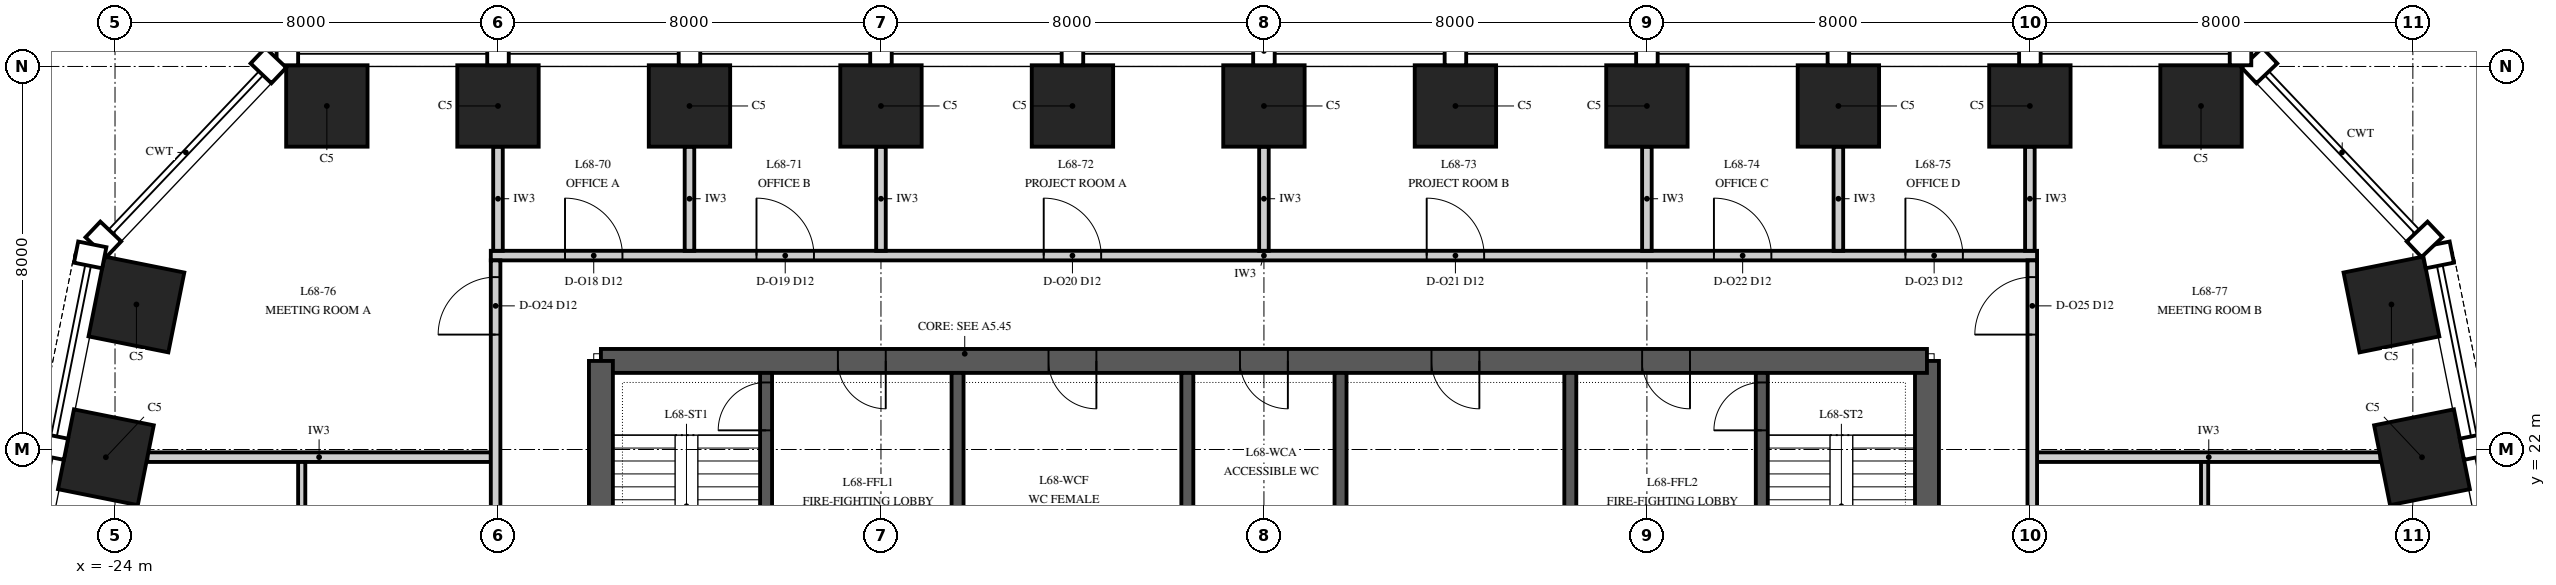
"""IFC4 building model, lengths in metres.
Left out: names, types, materials, properties, quantities, classifications, styles, units other than length and angle.
Written with IfcOpenShell. Run it as: python <this file> out.ifc"""

import sys

from ifc_helpers import new_model, si_unit, direction, frame, frame_2d, origin, origin_2d, place, context, subcontext, project, spatial, polyline, rectangle, outline, extrude, element, fill, save


model = new_model("IFC4")
c1 = context("Model", 3, precision=1e-05, world=origin(), true_north=direction((0.0, 1.0)))
c2 = subcontext(c1, "Body", "Model", "MODEL_VIEW")
j1 = project(units=[si_unit("LENGTHUNIT", "METRE"), si_unit("PLANEANGLEUNIT", "RADIAN")], contexts=[c1])
p1 = place(None, origin())
s1 = spatial("IfcSite", under=j1, at=p1, CompositionType="ELEMENT")
p2 = place(p1, origin())
s2 = spatial("IfcBuilding", under=s1, at=p2, CompositionType="ELEMENT")
p3 = place(p2, frame((0.0, 0.0, 292.0)))
s3 = spatial("IfcBuildingStorey", under=s2, at=p3, CompositionType="ELEMENT", Elevation=292.0)
for number, where, z_axis, x_axis in (
    (1, (24.191, 21.838, 0.0), (0.0, 0.0, 1.0), (-0.196, 0.981, 0.0)),
    (2, (23.553, 25.029, 0.0), (0.0, 0.0, 1.0), (-0.196, 0.981, 0.0)),
    (3, (19.575, 29.175, 0.0), (0.0, 0.0, 1.0), (-1.0, 0.0, 0.0)),
    (4, (16.0, 29.175, 0.0), (0.0, 0.0, 1.0), (-1.0, 0.0, 0.0)),
    (5, (12.0, 29.175, 0.0), (0.0, 0.0, 1.0), (-1.0, 0.0, 0.0)),
    (6, (8.0, 29.175, 0.0), (0.0, 0.0, 1.0), (-1.0, 0.0, 0.0)),
    (7, (4.0, 29.175, 0.0), (0.0, 0.0, 1.0), (-1.0, 0.0, 0.0)),
    (8, (0.0, 29.175, 0.0), (0.0, 0.0, 1.0), (-1.0, 0.0, 0.0)),
    (9, (-4.0, 29.175, 0.0), (0.0, 0.0, 1.0), (-1.0, 0.0, 0.0)),
    (10, (-8.0, 29.175, 0.0), (0.0, 0.0, 1.0), (-1.0, 0.0, 0.0)),
    (11, (-12.0, 29.175, 0.0), (0.0, 0.0, 1.0), (-1.0, 0.0, 0.0)),
    (12, (-16.0, 29.175, 0.0), (0.0, 0.0, 1.0), (-1.0, 0.0, 0.0)),
    (13, (-19.575, 29.175, 0.0), (0.0, 0.0, 1.0), (-1.0, 0.0, 0.0)),
    (14, (-23.553, 25.029, 0.0), (0.0, 0.0, 1.0), (-0.196, -0.981, 0.0)),
    (15, (-24.191, 21.838, 0.0), (0.0, 0.0, 1.0), (-0.196, -0.981, 0.0)),
):
    element("IfcColumn", number, at=place(p3, frame(where, z_axis=z_axis, x_axis=x_axis)), inside=s3, PredefinedType="COLUMN", context=c2, shape_type="SweptSolid", body=[
        extrude(rectangle(XDim=1.7, YDim=1.7, at=origin_2d()), origin(), (0.0, 0.0, 1.0), 4.0),
    ])
p4 = place(p3, frame((13.85, 6.15, 0.0), z_axis=(0.0, 0.0, 1.0), x_axis=(0.0, 1.0, 0.0)))
e16 = element("IfcWall", 16, at=p4, inside=s3, PredefinedType="SHEAR", context=c2, shape_type="SweptSolid", body=[
    extrude(outline(polyline([(0.0, -0.25), (17.7, -0.25), (17.7, 0.0), (17.45, 0.0), (17.45, 0.25), (0.25, 0.25), (0.25, 0.0), (0.0, 0.0), (0.0, -0.25)])), origin(), (0.0, 0.0, 1.0), 4.0),
])
p5 = place(p4, frame((4.15, 0.0, 0.0)))
e17 = element("IfcOpeningElement", 17, at=p5, cuts=e16, PredefinedType="OPENING", context=c2, shape_type="SweptSolid", body=[
    extrude(rectangle(XDim=1.8, YDim=2.4, at=frame_2d((0.9, 1.2))), frame((0.0, 0.265, 0.0), z_axis=(0.0, -1.0, 0.0), x_axis=(1.0, 0.0, 0.0)), (0.0, 0.0, 1.0), 0.53),
])
p6 = place(p3, frame((13.85, 23.85, 0.0), z_axis=(0.0, 0.0, 1.0), x_axis=(-1.0, 0.0, 0.0)))
e18 = element("IfcWall", 18, at=p6, inside=s3, PredefinedType="SHEAR", context=c2, shape_type="SweptSolid", body=[
    extrude(rectangle(XDim=27.7, YDim=0.5, at=frame_2d((13.85, 0.0))), origin(), (0.0, 0.0, 1.0), 4.0),
])
p7 = place(p6, frame((21.75, 0.0, 0.0)))
e19 = element("IfcOpeningElement", 19, at=p7, cuts=e18, PredefinedType="OPENING", context=c2, shape_type="SweptSolid", body=[
    extrude(rectangle(XDim=1.0, YDim=2.1, at=frame_2d((0.5, 1.05))), frame((0.0, 0.265, 0.0), z_axis=(0.0, -1.0, 0.0), x_axis=(1.0, 0.0, 0.0)), (0.0, 0.0, 1.0), 0.53),
])
p8 = place(p6, frame((4.95, 0.0, 0.0)))
e20 = element("IfcOpeningElement", 20, at=p8, cuts=e18, PredefinedType="OPENING", context=c2, shape_type="SweptSolid", body=[
    extrude(rectangle(XDim=1.0, YDim=2.1, at=frame_2d((0.5, 1.05))), frame((0.0, 0.265, 0.0), z_axis=(0.0, -1.0, 0.0), x_axis=(1.0, 0.0, 0.0)), (0.0, 0.0, 1.0), 0.53),
])
p9 = place(p6, frame((17.35, 0.0, 0.0)))
e21 = element("IfcOpeningElement", 21, at=p9, cuts=e18, PredefinedType="OPENING", context=c2, shape_type="SweptSolid", body=[
    extrude(rectangle(XDim=1.0, YDim=2.1, at=frame_2d((0.5, 1.05))), frame((0.0, 0.265, 0.0), z_axis=(0.0, -1.0, 0.0), x_axis=(1.0, 0.0, 0.0)), (0.0, 0.0, 1.0), 0.53),
])
p10 = place(p6, frame((13.35, 0.0, 0.0)))
e22 = element("IfcOpeningElement", 22, at=p10, cuts=e18, PredefinedType="OPENING", context=c2, shape_type="SweptSolid", body=[
    extrude(rectangle(XDim=1.0, YDim=2.1, at=frame_2d((0.5, 1.05))), frame((0.0, 0.265, 0.0), z_axis=(0.0, -1.0, 0.0), x_axis=(1.0, 0.0, 0.0)), (0.0, 0.0, 1.0), 0.53),
])
p11 = place(p6, frame((9.35, 0.0, 0.0)))
e23 = element("IfcOpeningElement", 23, at=p11, cuts=e18, PredefinedType="OPENING", context=c2, shape_type="SweptSolid", body=[
    extrude(rectangle(XDim=1.0, YDim=2.1, at=frame_2d((0.5, 1.05))), frame((0.0, 0.265, 0.0), z_axis=(0.0, -1.0, 0.0), x_axis=(1.0, 0.0, 0.0)), (0.0, 0.0, 1.0), 0.53),
])
p12 = place(p3, frame((-13.85, 23.85, 0.0), z_axis=(0.0, 0.0, 1.0), x_axis=(0.0, -1.0, 0.0)))
e24 = element("IfcWall", 24, at=p12, inside=s3, PredefinedType="SHEAR", context=c2, shape_type="SweptSolid", body=[
    extrude(outline(polyline([(0.0, -0.25), (17.7, -0.25), (17.7, 0.0), (17.45, 0.0), (17.45, 0.25), (0.25, 0.25), (0.25, 0.0), (0.0, 0.0), (0.0, -0.25)])), origin(), (0.0, 0.0, 1.0), 4.0),
])
p13 = place(p12, frame((11.75, 0.0, 0.0)))
e25 = element("IfcOpeningElement", 25, at=p13, cuts=e24, PredefinedType="OPENING", context=c2, shape_type="SweptSolid", body=[
    extrude(rectangle(XDim=1.8, YDim=2.4, at=frame_2d((0.9, 1.2))), frame((0.0, 0.265, 0.0), z_axis=(0.0, -1.0, 0.0), x_axis=(1.0, 0.0, 0.0)), (0.0, 0.0, 1.0), 0.53),
])
p14 = place(p3, frame((-10.4, 16.125, 0.0), z_axis=(0.0, 0.0, 1.0), x_axis=(0.0, 1.0, 0.0)))
e26 = element("IfcWall", 26, at=p14, inside=s3, PredefinedType="SHEAR", context=c2, shape_type="SweptSolid", body=[
    extrude(rectangle(XDim=7.475, YDim=0.25, at=frame_2d((3.738, 0.0))), origin(), (0.0, 0.0, 1.0), 4.0),
])
p15 = place(p14, frame((6.275, 0.0, 0.0)))
e27 = element("IfcOpeningElement", 27, at=p15, cuts=e26, PredefinedType="OPENING", context=c2, shape_type="SweptSolid", body=[
    extrude(rectangle(XDim=1.0, YDim=2.1, at=frame_2d((0.5, 1.05))), frame((0.0, 0.14, 0.0), z_axis=(0.0, -1.0, 0.0), x_axis=(1.0, 0.0, 0.0)), (0.0, 0.0, 1.0), 0.28),
])
for number, where, z_axis, x_axis in (
    (28, (-6.4, 16.125, 0.0), (0.0, 0.0, 1.0), (0.0, 1.0, 0.0)),
    (29, (-1.6, 16.125, 0.0), (0.0, 0.0, 1.0), (0.0, 1.0, 0.0)),
    (30, (1.6, 16.125, 0.0), (0.0, 0.0, 1.0), (0.0, 1.0, 0.0)),
    (31, (6.4, 16.125, 0.0), (0.0, 0.0, 1.0), (0.0, 1.0, 0.0)),
):
    element("IfcWall", number, at=place(p3, frame(where, z_axis=z_axis, x_axis=x_axis)), inside=s3, PredefinedType="SHEAR", context=c2, shape_type="SweptSolid", body=[
        extrude(rectangle(XDim=7.475, YDim=0.25, at=frame_2d((3.738, 0.0))), origin(), (0.0, 0.0, 1.0), 4.0),
    ])
p16 = place(p3, frame((10.4, 16.125, 0.0), z_axis=(0.0, 0.0, 1.0), x_axis=(0.0, 1.0, 0.0)))
e32 = element("IfcWall", 32, at=p16, inside=s3, PredefinedType="SHEAR", context=c2, shape_type="SweptSolid", body=[
    extrude(rectangle(XDim=7.475, YDim=0.25, at=frame_2d((3.738, 0.0))), origin(), (0.0, 0.0, 1.0), 4.0),
])
p17 = place(p16, frame((6.275, 0.0, 0.0)))
e33 = element("IfcOpeningElement", 33, at=p17, cuts=e32, PredefinedType="OPENING", context=c2, shape_type="SweptSolid", body=[
    extrude(rectangle(XDim=1.0, YDim=2.1, at=frame_2d((0.5, 1.05))), frame((0.0, 0.14, 0.0), z_axis=(0.0, -1.0, 0.0), x_axis=(1.0, 0.0, 0.0)), (0.0, 0.0, 1.0), 0.28),
])
for number, where, z_axis, x_axis in (
    (34, (-23.324, 21.84, 0.0), (0.0, 0.0, 1.0), (1.0, 0.0, 0.0)),
    (35, (16.15, 21.84, 0.0), (0.0, 0.0, 1.0), (1.0, 0.0, 0.0)),
):
    element("IfcWall", number, at=place(p3, frame(where, z_axis=z_axis, x_axis=x_axis)), inside=s3, PredefinedType="PARTITIONING", context=c2, shape_type="SweptSolid", body=[
        extrude(rectangle(XDim=7.174, YDim=0.2, at=frame_2d((3.587, 0.0))), origin(), (0.0, 0.0, 1.0), 3.23),
    ])
p18 = place(p3, frame((-16.15, 26.05, 0.0), z_axis=(0.0, 0.0, 1.0), x_axis=(1.0, 0.0, 0.0)))
e36 = element("IfcWall", 36, at=p18, inside=s3, PredefinedType="PARTITIONING", context=c2, shape_type="SweptSolid", body=[
    extrude(rectangle(XDim=32.3, YDim=0.2, at=frame_2d((16.15, 0.0))), origin(), (0.0, 0.0, 1.0), 3.418),
])
p19 = place(p18, frame((1.55, 0.0, 0.0)))
e37 = element("IfcOpeningElement", 37, at=p19, cuts=e36, PredefinedType="OPENING", context=c2, shape_type="SweptSolid", body=[
    extrude(rectangle(XDim=1.2, YDim=2.4, at=frame_2d((0.6, 1.2))), frame((0.0, 0.115, 0.0), z_axis=(0.0, -1.0, 0.0), x_axis=(1.0, 0.0, 0.0)), (0.0, 0.0, 1.0), 0.23),
])
p20 = place(p18, frame((5.55, 0.0, 0.0)))
e38 = element("IfcOpeningElement", 38, at=p20, cuts=e36, PredefinedType="OPENING", context=c2, shape_type="SweptSolid", body=[
    extrude(rectangle(XDim=1.2, YDim=2.4, at=frame_2d((0.6, 1.2))), frame((0.0, 0.115, 0.0), z_axis=(0.0, -1.0, 0.0), x_axis=(1.0, 0.0, 0.0)), (0.0, 0.0, 1.0), 0.23),
])
p21 = place(p18, frame((11.55, 0.0, 0.0)))
e39 = element("IfcOpeningElement", 39, at=p21, cuts=e36, PredefinedType="OPENING", context=c2, shape_type="SweptSolid", body=[
    extrude(rectangle(XDim=1.2, YDim=2.4, at=frame_2d((0.6, 1.2))), frame((0.0, 0.115, 0.0), z_axis=(0.0, -1.0, 0.0), x_axis=(1.0, 0.0, 0.0)), (0.0, 0.0, 1.0), 0.23),
])
p22 = place(p18, frame((19.55, 0.0, 0.0)))
e40 = element("IfcOpeningElement", 40, at=p22, cuts=e36, PredefinedType="OPENING", context=c2, shape_type="SweptSolid", body=[
    extrude(rectangle(XDim=1.2, YDim=2.4, at=frame_2d((0.6, 1.2))), frame((0.0, 0.115, 0.0), z_axis=(0.0, -1.0, 0.0), x_axis=(1.0, 0.0, 0.0)), (0.0, 0.0, 1.0), 0.23),
])
p23 = place(p18, frame((25.55, 0.0, 0.0)))
e41 = element("IfcOpeningElement", 41, at=p23, cuts=e36, PredefinedType="OPENING", context=c2, shape_type="SweptSolid", body=[
    extrude(rectangle(XDim=1.2, YDim=2.4, at=frame_2d((0.6, 1.2))), frame((0.0, 0.115, 0.0), z_axis=(0.0, -1.0, 0.0), x_axis=(1.0, 0.0, 0.0)), (0.0, 0.0, 1.0), 0.23),
])
p24 = place(p18, frame((29.55, 0.0, 0.0)))
e42 = element("IfcOpeningElement", 42, at=p24, cuts=e36, PredefinedType="OPENING", context=c2, shape_type="SweptSolid", body=[
    extrude(rectangle(XDim=1.2, YDim=2.4, at=frame_2d((0.6, 1.2))), frame((0.0, 0.115, 0.0), z_axis=(0.0, -1.0, 0.0), x_axis=(1.0, 0.0, 0.0)), (0.0, 0.0, 1.0), 0.23),
])
p25 = place(p3, frame((-20.1, 13.915, 0.0), z_axis=(0.0, 0.0, 1.0), x_axis=(0.0, 1.0, 0.0)))
e43 = element("IfcWall", 43, at=p25, inside=s3, PredefinedType="PARTITIONING", context=c2, shape_type="SweptSolid", body=[
    extrude(rectangle(XDim=7.825, YDim=0.15, at=frame_2d((3.913, 0.0))), origin(), (0.0, 0.0, 1.0), 3.23),
])
p26 = place(p25, frame((3.425, 0.0, 0.0)))
e44 = element("IfcOpeningElement", 44, at=p26, cuts=e43, PredefinedType="OPENING", context=c2, shape_type="SweptSolid", body=[
    extrude(rectangle(XDim=1.0, YDim=2.3, at=frame_2d((0.5, 1.15))), frame((0.0, 0.09, 0.0), z_axis=(0.0, -1.0, 0.0), x_axis=(1.0, 0.0, 0.0)), (0.0, 0.0, 1.0), 0.18),
])
p27 = place(p3, frame((-16.05, 4.05, 0.0), z_axis=(0.0, 0.0, 1.0), x_axis=(0.0, 1.0, 0.0)))
e45 = element("IfcWall", 45, at=p27, inside=s3, PredefinedType="PARTITIONING", context=c2, shape_type="SweptSolid", body=[
    extrude(rectangle(XDim=21.9, YDim=0.2, at=frame_2d((10.95, 0.0))), origin(), (0.0, 0.0, 1.0), 2.842),
])
p28 = place(p27, frame((20.35, 0.0, 0.0)))
e46 = element("IfcOpeningElement", 46, at=p28, cuts=e45, PredefinedType="OPENING", context=c2, shape_type="SweptSolid", body=[
    extrude(rectangle(XDim=1.2, YDim=2.4, at=frame_2d((0.6, 1.2))), frame((0.0, 0.115, 0.0), z_axis=(0.0, -1.0, 0.0), x_axis=(1.0, 0.0, 0.0)), (0.0, 0.0, 1.0), 0.23),
])
p29 = place(p27, frame((10.35, 0.0, 0.0)))
e47 = element("IfcOpeningElement", 47, at=p29, cuts=e45, PredefinedType="OPENING", context=c2, shape_type="SweptSolid", body=[
    extrude(rectangle(XDim=1.2, YDim=2.4, at=frame_2d((0.6, 1.2))), frame((0.0, 0.115, 0.0), z_axis=(0.0, -1.0, 0.0), x_axis=(1.0, 0.0, 0.0)), (0.0, 0.0, 1.0), 0.23),
])
for number, where, z_axis, x_axis in (
    (48, (-16.0, 26.15, 0.0), (0.0, 0.0, 1.0), (0.0, 1.0, 0.0)),
    (49, (-12.0, 26.15, 0.0), (0.0, 0.0, 1.0), (0.0, 1.0, 0.0)),
    (50, (-8.0, 26.15, 0.0), (0.0, 0.0, 1.0), (0.0, 1.0, 0.0)),
    (51, (0.0, 26.15, 0.0), (0.0, 0.0, 1.0), (0.0, 1.0, 0.0)),
    (52, (8.0, 26.15, 0.0), (0.0, 0.0, 1.0), (0.0, 1.0, 0.0)),
    (53, (12.0, 26.15, 0.0), (0.0, 0.0, 1.0), (0.0, 1.0, 0.0)),
    (54, (16.0, 26.15, 0.0), (0.0, 0.0, 1.0), (0.0, 1.0, 0.0)),
):
    element("IfcWall", number, at=place(p3, frame(where, z_axis=z_axis, x_axis=x_axis)), inside=s3, PredefinedType="PARTITIONING", context=c2, shape_type="SweptSolid", body=[
        extrude(rectangle(XDim=2.175, YDim=0.2, at=frame_2d((1.087, 0.0))), origin(), (0.0, 0.0, 1.0), 3.418),
    ])
p30 = place(p3, frame((16.05, 4.05, 0.0), z_axis=(0.0, 0.0, 1.0), x_axis=(0.0, 1.0, 0.0)))
e55 = element("IfcWall", 55, at=p30, inside=s3, PredefinedType="PARTITIONING", context=c2, shape_type="SweptSolid", body=[
    extrude(rectangle(XDim=21.9, YDim=0.2, at=frame_2d((10.95, 0.0))), origin(), (0.0, 0.0, 1.0), 2.842),
])
p31 = place(p30, frame((20.35, 0.0, 0.0)))
e56 = element("IfcOpeningElement", 56, at=p31, cuts=e55, PredefinedType="OPENING", context=c2, shape_type="SweptSolid", body=[
    extrude(rectangle(XDim=1.2, YDim=2.4, at=frame_2d((0.6, 1.2))), frame((0.0, 0.115, 0.0), z_axis=(0.0, -1.0, 0.0), x_axis=(1.0, 0.0, 0.0)), (0.0, 0.0, 1.0), 0.23),
])
p32 = place(p30, frame((10.35, 0.0, 0.0)))
e57 = element("IfcOpeningElement", 57, at=p32, cuts=e55, PredefinedType="OPENING", context=c2, shape_type="SweptSolid", body=[
    extrude(rectangle(XDim=1.2, YDim=2.4, at=frame_2d((0.6, 1.2))), frame((0.0, 0.115, 0.0), z_axis=(0.0, -1.0, 0.0), x_axis=(1.0, 0.0, 0.0)), (0.0, 0.0, 1.0), 0.23),
])
p33 = place(p3, frame((19.65, 17.915, 0.0), z_axis=(0.0, 0.0, 1.0), x_axis=(0.0, 1.0, 0.0)))
e58 = element("IfcWall", 58, at=p33, inside=s3, PredefinedType="PARTITIONING", context=c2, shape_type="SweptSolid", body=[
    extrude(rectangle(XDim=3.825, YDim=0.15, at=frame_2d((1.913, 0.0))), origin(), (0.0, 0.0, 1.0), 3.23),
])
p34 = place(p33, frame((1.425, 0.0, 0.0)))
e59 = element("IfcOpeningElement", 59, at=p34, cuts=e58, PredefinedType="OPENING", context=c2, shape_type="SweptSolid", body=[
    extrude(rectangle(XDim=1.0, YDim=2.3, at=frame_2d((0.5, 1.15))), frame((0.0, 0.09, 0.0), z_axis=(0.0, -1.0, 0.0), x_axis=(1.0, 0.0, 0.0)), (0.0, 0.0, 1.0), 0.18),
])
p35 = place(p7, origin())
e60 = element("IfcDoor", 60, at=p35, inside=s3, OperationType="SINGLE_SWING_RIGHT", PredefinedType="DOOR", context=c2, shape_type="SweptSolid", body=[
    extrude(rectangle(XDim=1.0, YDim=2.1, at=frame_2d((0.5, 1.05))), frame((0.0, 0.25, 0.0), z_axis=(0.0, -1.0, 0.0), x_axis=(1.0, 0.0, 0.0)), (0.0, 0.0, 1.0), 0.5),
])
fill(e19, e60)
p36 = place(p8, origin())
e61 = element("IfcDoor", 61, at=p36, inside=s3, OperationType="SINGLE_SWING_RIGHT", PredefinedType="DOOR", context=c2, shape_type="SweptSolid", body=[
    extrude(rectangle(XDim=1.0, YDim=2.1, at=frame_2d((0.5, 1.05))), frame((0.0, 0.25, 0.0), z_axis=(0.0, -1.0, 0.0), x_axis=(1.0, 0.0, 0.0)), (0.0, 0.0, 1.0), 0.5),
])
fill(e20, e61)
p37 = place(p9, origin())
e62 = element("IfcDoor", 62, at=p37, inside=s3, OperationType="SINGLE_SWING_LEFT", PredefinedType="DOOR", context=c2, shape_type="SweptSolid", body=[
    extrude(rectangle(XDim=1.0, YDim=2.1, at=frame_2d((0.5, 1.05))), frame((0.0, 0.25, 0.0), z_axis=(0.0, -1.0, 0.0), x_axis=(1.0, 0.0, 0.0)), (0.0, 0.0, 1.0), 0.5),
])
fill(e21, e62)
p38 = place(p10, origin())
e63 = element("IfcDoor", 63, at=p38, inside=s3, OperationType="SINGLE_SWING_LEFT", PredefinedType="DOOR", context=c2, shape_type="SweptSolid", body=[
    extrude(rectangle(XDim=1.0, YDim=2.1, at=frame_2d((0.5, 1.05))), frame((0.0, 0.25, 0.0), z_axis=(0.0, -1.0, 0.0), x_axis=(1.0, 0.0, 0.0)), (0.0, 0.0, 1.0), 0.5),
])
fill(e22, e63)
p39 = place(p11, origin())
e64 = element("IfcDoor", 64, at=p39, inside=s3, OperationType="SINGLE_SWING_LEFT", PredefinedType="DOOR", context=c2, shape_type="SweptSolid", body=[
    extrude(rectangle(XDim=1.0, YDim=2.1, at=frame_2d((0.5, 1.05))), frame((0.0, 0.25, 0.0), z_axis=(0.0, -1.0, 0.0), x_axis=(1.0, 0.0, 0.0)), (0.0, 0.0, 1.0), 0.5),
])
fill(e23, e64)
p40 = place(p15, origin())
e65 = element("IfcDoor", 65, at=p40, inside=s3, OperationType="SINGLE_SWING_LEFT", PredefinedType="DOOR", context=c2, shape_type="SweptSolid", body=[
    extrude(rectangle(XDim=1.0, YDim=2.1, at=frame_2d((0.5, 1.05))), frame((0.0, 0.125, 0.0), z_axis=(0.0, -1.0, 0.0), x_axis=(1.0, 0.0, 0.0)), (0.0, 0.0, 1.0), 0.25),
])
fill(e27, e65)
p41 = place(p17, origin())
e66 = element("IfcDoor", 66, at=p41, inside=s3, OperationType="SINGLE_SWING_LEFT", PredefinedType="DOOR", context=c2, shape_type="SweptSolid", body=[
    extrude(rectangle(XDim=1.0, YDim=2.1, at=frame_2d((0.5, 1.05))), frame((0.0, 0.125, 0.0), z_axis=(0.0, -1.0, 0.0), x_axis=(1.0, 0.0, 0.0)), (0.0, 0.0, 1.0), 0.25),
])
fill(e33, e66)
p42 = place(p19, origin())
e67 = element("IfcDoor", 67, at=p42, inside=s3, OperationType="SINGLE_SWING_LEFT", PredefinedType="DOOR", context=c2, shape_type="SweptSolid", body=[
    extrude(rectangle(XDim=1.2, YDim=2.4, at=frame_2d((0.6, 1.2))), frame((0.0, 0.1, 0.0), z_axis=(0.0, -1.0, 0.0), x_axis=(1.0, 0.0, 0.0)), (0.0, 0.0, 1.0), 0.199),
])
fill(e37, e67)
p43 = place(p20, origin())
e68 = element("IfcDoor", 68, at=p43, inside=s3, OperationType="SINGLE_SWING_LEFT", PredefinedType="DOOR", context=c2, shape_type="SweptSolid", body=[
    extrude(rectangle(XDim=1.2, YDim=2.4, at=frame_2d((0.6, 1.2))), frame((0.0, 0.1, 0.0), z_axis=(0.0, -1.0, 0.0), x_axis=(1.0, 0.0, 0.0)), (0.0, 0.0, 1.0), 0.199),
])
fill(e38, e68)
p44 = place(p21, origin())
e69 = element("IfcDoor", 69, at=p44, inside=s3, OperationType="SINGLE_SWING_LEFT", PredefinedType="DOOR", context=c2, shape_type="SweptSolid", body=[
    extrude(rectangle(XDim=1.2, YDim=2.4, at=frame_2d((0.6, 1.2))), frame((0.0, 0.1, 0.0), z_axis=(0.0, -1.0, 0.0), x_axis=(1.0, 0.0, 0.0)), (0.0, 0.0, 1.0), 0.199),
])
fill(e39, e69)
p45 = place(p22, origin())
e70 = element("IfcDoor", 70, at=p45, inside=s3, OperationType="SINGLE_SWING_LEFT", PredefinedType="DOOR", context=c2, shape_type="SweptSolid", body=[
    extrude(rectangle(XDim=1.2, YDim=2.4, at=frame_2d((0.6, 1.2))), frame((0.0, 0.1, 0.0), z_axis=(0.0, -1.0, 0.0), x_axis=(1.0, 0.0, 0.0)), (0.0, 0.0, 1.0), 0.199),
])
fill(e40, e70)
p46 = place(p23, origin())
e71 = element("IfcDoor", 71, at=p46, inside=s3, OperationType="SINGLE_SWING_LEFT", PredefinedType="DOOR", context=c2, shape_type="SweptSolid", body=[
    extrude(rectangle(XDim=1.2, YDim=2.4, at=frame_2d((0.6, 1.2))), frame((0.0, 0.1, 0.0), z_axis=(0.0, -1.0, 0.0), x_axis=(1.0, 0.0, 0.0)), (0.0, 0.0, 1.0), 0.199),
])
fill(e41, e71)
p47 = place(p24, origin())
e72 = element("IfcDoor", 72, at=p47, inside=s3, OperationType="SINGLE_SWING_LEFT", PredefinedType="DOOR", context=c2, shape_type="SweptSolid", body=[
    extrude(rectangle(XDim=1.2, YDim=2.4, at=frame_2d((0.6, 1.2))), frame((0.0, 0.1, 0.0), z_axis=(0.0, -1.0, 0.0), x_axis=(1.0, 0.0, 0.0)), (0.0, 0.0, 1.0), 0.199),
])
fill(e42, e72)
p48 = place(p28, origin())
e73 = element("IfcDoor", 73, at=p48, inside=s3, OperationType="SINGLE_SWING_LEFT", PredefinedType="DOOR", context=c2, shape_type="SweptSolid", body=[
    extrude(rectangle(XDim=1.2, YDim=2.4, at=frame_2d((0.6, 1.2))), frame((0.0, 0.1, 0.0), z_axis=(0.0, -1.0, 0.0), x_axis=(1.0, 0.0, 0.0)), (0.0, 0.0, 1.0), 0.199),
])
fill(e46, e73)
p49 = place(p31, origin())
e74 = element("IfcDoor", 74, at=p49, inside=s3, OperationType="SINGLE_SWING_LEFT", PredefinedType="DOOR", context=c2, shape_type="SweptSolid", body=[
    extrude(rectangle(XDim=1.2, YDim=2.4, at=frame_2d((0.6, 1.2))), frame((0.0, 0.1, 0.0), z_axis=(0.0, -1.0, 0.0), x_axis=(1.0, 0.0, 0.0)), (0.0, 0.0, 1.0), 0.199),
])
fill(e56, e74)
save(model, sys.argv[1])
